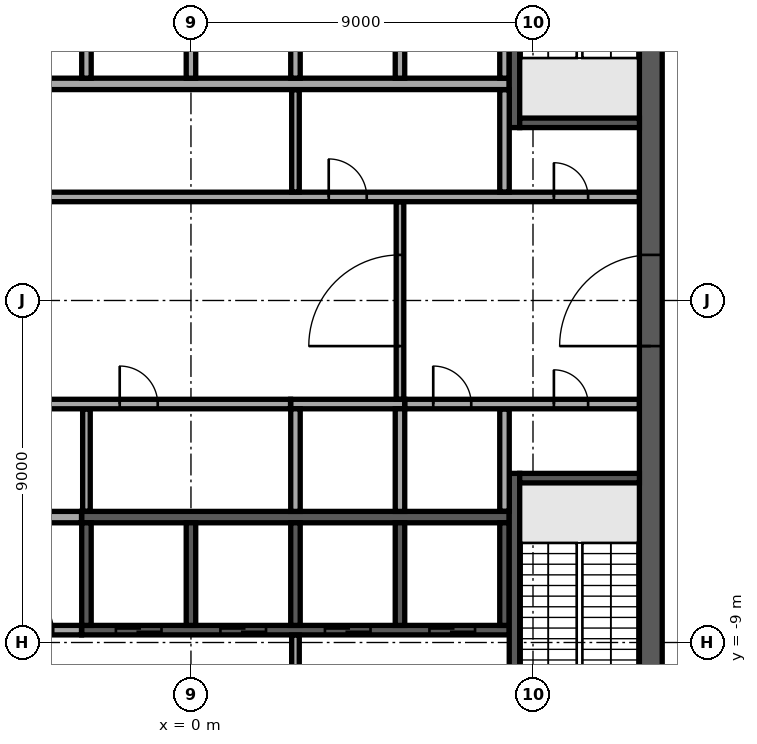
"""IFC4 building model, lengths in metres.
Left out: names, types, materials, properties, quantities, classifications, styles, units other than length and angle.
Written with IfcOpenShell. Run it as: python <this file> out.ifc"""

import sys

from ifc_helpers import new_model, si_unit, direction, frame, frame_2d, origin, place, context, subcontext, project, spatial, rectangle, extrude, element, fill, save


model = new_model("IFC4")
c1 = context("Model", 3, precision=1e-05, world=origin(), true_north=direction((0.0, 1.0)))
c2 = subcontext(c1, "Body", "Model", "MODEL_VIEW")
j1 = project(units=[si_unit("LENGTHUNIT", "METRE"), si_unit("PLANEANGLEUNIT", "RADIAN")], contexts=[c1])
p1 = place(None, origin())
s1 = spatial("IfcSite", under=j1, at=p1, CompositionType="ELEMENT")
p2 = place(p1, origin())
s2 = spatial("IfcBuilding", under=s1, at=p2, CompositionType="ELEMENT")
p3 = place(p2, frame((0.0, 0.0, 344.5)))
s3 = spatial("IfcBuildingStorey", under=s2, at=p3, CompositionType="ELEMENT", Elevation=344.5)
p4 = place(p3, frame((12.1, -11.8, 0.0), z_axis=(0.0, 0.0, 1.0), x_axis=(0.0, 1.0, 0.0)))
e1 = element("IfcWall", 1, at=p4, inside=s3, PredefinedType="SHEAR", context=c2, shape_type="SweptSolid", body=[
    extrude(rectangle(XDim=23.6, YDim=0.6, at=frame_2d((11.8, 0.0))), origin(), (0.0, 0.0, 1.0), 5.3),
])
p5 = place(p4, frame((10.6, 0.0, 0.0)))
e2 = element("IfcOpeningElement", 2, at=p5, cuts=e1, PredefinedType="OPENING", context=c2, shape_type="SweptSolid", body=[
    extrude(rectangle(XDim=2.4, YDim=2.4, at=frame_2d((1.2, 1.2))), frame((0.0, 0.31, 0.0), z_axis=(0.0, -1.0, 0.0), x_axis=(1.0, 0.0, 0.0)), (0.0, 0.0, 1.0), 0.62),
])
p6 = place(p3, frame((-8.375, 5.7, 0.0), z_axis=(0.0, 0.0, 1.0), x_axis=(1.0, 0.0, 0.0)))
e3 = element("IfcWall", 3, at=p6, inside=s3, PredefinedType="SOLIDWALL", context=c2, shape_type="SweptSolid", body=[
    extrude(rectangle(XDim=16.75, YDim=0.3, at=frame_2d((8.375, 0.0))), origin(), (0.0, 0.0, 1.0), 5.3),
])
p7 = place(p3, frame((-2.875, -5.7, 0.0), z_axis=(0.0, 0.0, 1.0), x_axis=(1.0, 0.0, 0.0)))
e4 = element("IfcWall", 4, at=p7, inside=s3, PredefinedType="SOLIDWALL", context=c2, shape_type="SweptSolid", body=[
    extrude(rectangle(XDim=11.25, YDim=0.3, at=frame_2d((5.625, 0.0))), origin(), (0.0, 0.0, 1.0), 5.3),
])
for number, where, z_axis, x_axis in (
    (5, (-2.75, 5.85, 0.0), (0.0, 0.0, 1.0), (0.0, 1.0, 0.0)),
    (6, (0.0, 5.85, 0.0), (0.0, 0.0, 1.0), (0.0, 1.0, 0.0)),
    (7, (2.75, 5.85, 0.0), (0.0, 0.0, 1.0), (0.0, 1.0, 0.0)),
    (8, (5.5, 5.85, 0.0), (0.0, 0.0, 1.0), (0.0, 1.0, 0.0)),
    (9, (8.25, 5.85, 0.0), (0.0, 0.0, 1.0), (0.0, 1.0, 0.0)),
):
    element("IfcWall", number, at=place(p3, frame(where, z_axis=z_axis, x_axis=x_axis)), inside=s3, PredefinedType="SOLIDWALL", context=c2, shape_type="SweptSolid", body=[
        extrude(rectangle(XDim=2.7, YDim=0.25, at=frame_2d((1.35, 0.0))), origin(), (0.0, 0.0, 1.0), 5.3),
    ])
p8 = place(p3, frame((2.625, -2.725, 0.0), z_axis=(0.0, 0.0, 1.0), x_axis=(1.0, 0.0, 0.0)))
e10 = element("IfcWall", 10, at=p8, inside=s3, PredefinedType="SOLIDWALL", context=c2, shape_type="SweptSolid", body=[
    extrude(rectangle(XDim=3.0, YDim=0.25, at=frame_2d((1.5, 0.0))), origin(), (0.0, 0.0, 1.0), 5.3),
])
for number, where, z_axis, x_axis in (
    (11, (2.75, -5.55, 0.0), (0.0, 0.0, 1.0), (0.0, 1.0, 0.0)),
    (12, (5.5, -5.55, 0.0), (0.0, 0.0, 1.0), (0.0, 1.0, 0.0)),
):
    element("IfcWall", number, at=place(p3, frame(where, z_axis=z_axis, x_axis=x_axis)), inside=s3, PredefinedType="SOLIDWALL", context=c2, shape_type="SweptSolid", body=[
        extrude(rectangle(XDim=2.7, YDim=0.25, at=frame_2d((1.35, 0.0))), origin(), (0.0, 0.0, 1.0), 5.3),
    ])
p9 = place(p3, frame((-2.875, -8.675, 0.0), z_axis=(0.0, 0.0, 1.0), x_axis=(1.0, 0.0, 0.0)))
e13 = element("IfcWall", 13, at=p9, inside=s3, PredefinedType="SOLIDWALL", context=c2, shape_type="SweptSolid", body=[
    extrude(rectangle(XDim=11.25, YDim=0.25, at=frame_2d((5.625, 0.0))), origin(), (0.0, 0.0, 1.0), 5.3),
])
p10 = place(p9, frame((0.9, 0.0, 0.0)))
e14 = element("IfcOpeningElement", 14, at=p10, cuts=e13, PredefinedType="OPENING", context=c2, shape_type="SweptSolid", body=[
    extrude(rectangle(XDim=1.2, YDim=2.1, at=frame_2d((0.6, 1.05))), frame((0.0, 0.135, 0.0), z_axis=(0.0, -1.0, 0.0), x_axis=(1.0, 0.0, 0.0)), (0.0, 0.0, 1.0), 0.27),
])
p11 = place(p9, frame((3.65, 0.0, 0.0)))
e15 = element("IfcOpeningElement", 15, at=p11, cuts=e13, PredefinedType="OPENING", context=c2, shape_type="SweptSolid", body=[
    extrude(rectangle(XDim=1.2, YDim=2.1, at=frame_2d((0.6, 1.05))), frame((0.0, 0.135, 0.0), z_axis=(0.0, -1.0, 0.0), x_axis=(1.0, 0.0, 0.0)), (0.0, 0.0, 1.0), 0.27),
])
p12 = place(p9, frame((6.4, 0.0, 0.0)))
e16 = element("IfcOpeningElement", 16, at=p12, cuts=e13, PredefinedType="OPENING", context=c2, shape_type="SweptSolid", body=[
    extrude(rectangle(XDim=1.2, YDim=2.1, at=frame_2d((0.6, 1.05))), frame((0.0, 0.135, 0.0), z_axis=(0.0, -1.0, 0.0), x_axis=(1.0, 0.0, 0.0)), (0.0, 0.0, 1.0), 0.27),
])
p13 = place(p9, frame((9.15, 0.0, 0.0)))
e17 = element("IfcOpeningElement", 17, at=p13, cuts=e13, PredefinedType="OPENING", context=c2, shape_type="SweptSolid", body=[
    extrude(rectangle(XDim=1.2, YDim=2.1, at=frame_2d((0.6, 1.05))), frame((0.0, 0.135, 0.0), z_axis=(0.0, -1.0, 0.0), x_axis=(1.0, 0.0, 0.0)), (0.0, 0.0, 1.0), 0.27),
])
for number, where, z_axis, x_axis in (
    (18, (-2.75, -8.55, 0.0), (0.0, 0.0, 1.0), (0.0, 1.0, 0.0)),
    (19, (0.0, -8.55, 0.0), (0.0, 0.0, 1.0), (0.0, 1.0, 0.0)),
    (20, (2.75, -8.55, 0.0), (0.0, 0.0, 1.0), (0.0, 1.0, 0.0)),
    (21, (5.5, -8.55, 0.0), (0.0, 0.0, 1.0), (0.0, 1.0, 0.0)),
    (22, (8.25, -8.55, 0.0), (0.0, 0.0, 1.0), (0.0, 1.0, 0.0)),
):
    element("IfcWall", number, at=place(p3, frame(where, z_axis=z_axis, x_axis=x_axis)), inside=s3, PredefinedType="SOLIDWALL", context=c2, shape_type="SweptSolid", body=[
        extrude(rectangle(XDim=2.7, YDim=0.25, at=frame_2d((1.35, 0.0))), origin(), (0.0, 0.0, 1.0), 5.3),
    ])
p14 = place(p3, frame((8.512, 4.55, 0.0), z_axis=(0.0, 0.0, 1.0), x_axis=(0.0, 1.0, 0.0)))
e23 = element("IfcWall", 23, at=p14, inside=s3, PredefinedType="SOLIDWALL", context=c2, shape_type="SweptSolid", body=[
    extrude(rectangle(XDim=7.25, YDim=0.275, at=frame_2d((3.625, 0.0))), origin(), (0.0, 0.0, 1.0), 5.3),
])
p15 = place(p14, frame((6.0, 0.0, 0.0)))
e24 = element("IfcOpeningElement", 24, at=p15, cuts=e23, PredefinedType="OPENING", context=c2, shape_type="SweptSolid", body=[
    extrude(rectangle(XDim=1.0, YDim=2.1, at=frame_2d((0.5, 1.05))), frame((0.0, 0.147, 0.0), z_axis=(0.0, -1.0, 0.0), x_axis=(1.0, 0.0, 0.0)), (0.0, 0.0, 1.0), 0.295),
])
p16 = place(p3, frame((8.65, 4.675, 0.0), z_axis=(0.0, 0.0, 1.0), x_axis=(1.0, 0.0, 0.0)))
e25 = element("IfcWall", 25, at=p16, inside=s3, PredefinedType="SOLIDWALL", context=c2, shape_type="SweptSolid", body=[
    extrude(rectangle(XDim=3.15, YDim=0.25, at=frame_2d((1.575, 0.0))), origin(), (0.0, 0.0, 1.0), 5.3),
])
p17 = place(p3, frame((8.512, -4.55, 0.0), z_axis=(0.0, 0.0, 1.0), x_axis=(0.0, -1.0, 0.0)))
e26 = element("IfcWall", 26, at=p17, inside=s3, PredefinedType="SOLIDWALL", context=c2, shape_type="SweptSolid", body=[
    extrude(rectangle(XDim=7.25, YDim=0.275, at=frame_2d((3.625, 0.0))), origin(), (0.0, 0.0, 1.0), 5.3),
])
p18 = place(p17, frame((6.0, 0.0, 0.0)))
e27 = element("IfcOpeningElement", 27, at=p18, cuts=e26, PredefinedType="OPENING", context=c2, shape_type="SweptSolid", body=[
    extrude(rectangle(XDim=1.0, YDim=2.1, at=frame_2d((0.5, 1.05))), frame((0.0, 0.147, 0.0), z_axis=(0.0, -1.0, 0.0), x_axis=(1.0, 0.0, 0.0)), (0.0, 0.0, 1.0), 0.295),
])
p19 = place(p3, frame((8.65, -4.675, 0.0), z_axis=(0.0, 0.0, 1.0), x_axis=(1.0, 0.0, 0.0)))
e28 = element("IfcWall", 28, at=p19, inside=s3, PredefinedType="SOLIDWALL", context=c2, shape_type="SweptSolid", body=[
    extrude(rectangle(XDim=3.15, YDim=0.25, at=frame_2d((1.575, 0.0))), origin(), (0.0, 0.0, 1.0), 5.3),
])
p20 = place(p3, frame((2.75, -11.795, 0.0), z_axis=(0.0, 0.0, 1.0), x_axis=(0.0, 1.0, 0.0)))
e29 = element("IfcWall", 29, at=p20, inside=s3, PredefinedType="PARTITIONING", context=c2, shape_type="SweptSolid", body=[
    extrude(rectangle(XDim=2.99, YDim=0.2, at=frame_2d((1.495, 0.0))), origin(), (0.0, 0.0, 1.0), 5.3),
])
p21 = place(p3, frame((-8.37, -8.675, 0.0), z_axis=(0.0, 0.0, 1.0), x_axis=(1.0, 0.0, 0.0)))
e30 = element("IfcWall", 30, at=p21, inside=s3, PredefinedType="PARTITIONING", context=c2, shape_type="SweptSolid", body=[
    extrude(rectangle(XDim=5.49, YDim=0.25, at=frame_2d((2.745, 0.0))), origin(), (0.0, 0.0, 1.0), 5.3),
])
p22 = place(p21, frame((0.995, 0.0, 0.0)))
e31 = element("IfcOpeningElement", 31, at=p22, cuts=e30, PredefinedType="OPENING", context=c2, shape_type="SweptSolid", body=[
    extrude(rectangle(XDim=1.0, YDim=2.1, at=frame_2d((0.5, 1.05))), frame((0.0, 0.135, 0.0), z_axis=(0.0, -1.0, 0.0), x_axis=(1.0, 0.0, 0.0)), (0.0, 0.0, 1.0), 0.27),
])
p23 = place(p21, frame((3.745, 0.0, 0.0)))
e32 = element("IfcOpeningElement", 32, at=p23, cuts=e30, PredefinedType="OPENING", context=c2, shape_type="SweptSolid", body=[
    extrude(rectangle(XDim=1.0, YDim=2.1, at=frame_2d((0.5, 1.05))), frame((0.0, 0.135, 0.0), z_axis=(0.0, -1.0, 0.0), x_axis=(1.0, 0.0, 0.0)), (0.0, 0.0, 1.0), 0.27),
])
p24 = place(p3, frame((-8.35, -5.7, 0.0), z_axis=(0.0, 0.0, 1.0), x_axis=(1.0, 0.0, 0.0)))
e33 = element("IfcWall", 33, at=p24, inside=s3, PredefinedType="PARTITIONING", context=c2, shape_type="SweptSolid", body=[
    extrude(rectangle(XDim=5.47, YDim=0.3, at=frame_2d((2.735, 0.0))), origin(), (0.0, 0.0, 1.0), 5.3),
])
p25 = place(p3, frame((-2.75, -5.545, 0.0), z_axis=(0.0, 0.0, 1.0), x_axis=(0.0, 1.0, 0.0)))
e34 = element("IfcWall", 34, at=p25, inside=s3, PredefinedType="PARTITIONING", context=c2, shape_type="SweptSolid", body=[
    extrude(rectangle(XDim=2.69, YDim=0.2, at=frame_2d((1.345, 0.0))), origin(), (0.0, 0.0, 1.0), 5.3),
])
p26 = place(p3, frame((8.25, -5.545, 0.0), z_axis=(0.0, 0.0, 1.0), x_axis=(0.0, 1.0, 0.0)))
e35 = element("IfcWall", 35, at=p26, inside=s3, PredefinedType="PARTITIONING", context=c2, shape_type="SweptSolid", body=[
    extrude(rectangle(XDim=2.69, YDim=0.25, at=frame_2d((1.345, 0.0))), origin(), (0.0, 0.0, 1.0), 5.3),
])
p27 = place(p3, frame((-11.795, -2.725, 0.0), z_axis=(0.0, 0.0, 1.0), x_axis=(1.0, 0.0, 0.0)))
e36 = element("IfcWall", 36, at=p27, inside=s3, PredefinedType="PARTITIONING", context=c2, shape_type="SweptSolid", body=[
    extrude(rectangle(XDim=14.415, YDim=0.25, at=frame_2d((7.208, 0.0))), origin(), (0.0, 0.0, 1.0), 5.3),
])
p28 = place(p27, frame((1.295, 0.0, 0.0)))
e37 = element("IfcOpeningElement", 37, at=p28, cuts=e36, PredefinedType="OPENING", context=c2, shape_type="SweptSolid", body=[
    extrude(rectangle(XDim=1.0, YDim=2.1, at=frame_2d((0.5, 1.05))), frame((0.0, 0.135, 0.0), z_axis=(0.0, -1.0, 0.0), x_axis=(1.0, 0.0, 0.0)), (0.0, 0.0, 1.0), 0.27),
])
p29 = place(p27, frame((4.42, 0.0, 0.0)))
e38 = element("IfcOpeningElement", 38, at=p29, cuts=e36, PredefinedType="OPENING", context=c2, shape_type="SweptSolid", body=[
    extrude(rectangle(XDim=1.0, YDim=2.1, at=frame_2d((0.5, 1.05))), frame((0.0, 0.135, 0.0), z_axis=(0.0, -1.0, 0.0), x_axis=(1.0, 0.0, 0.0)), (0.0, 0.0, 1.0), 0.27),
])
p30 = place(p27, frame((9.92, 0.0, 0.0)))
e39 = element("IfcOpeningElement", 39, at=p30, cuts=e36, PredefinedType="OPENING", context=c2, shape_type="SweptSolid", body=[
    extrude(rectangle(XDim=1.0, YDim=2.1, at=frame_2d((0.5, 1.05))), frame((0.0, 0.135, 0.0), z_axis=(0.0, -1.0, 0.0), x_axis=(1.0, 0.0, 0.0)), (0.0, 0.0, 1.0), 0.27),
])
p31 = place(p3, frame((5.63, -2.725, 0.0), z_axis=(0.0, 0.0, 1.0), x_axis=(1.0, 0.0, 0.0)))
e40 = element("IfcWall", 40, at=p31, inside=s3, PredefinedType="PARTITIONING", context=c2, shape_type="SweptSolid", body=[
    extrude(rectangle(XDim=6.165, YDim=0.25, at=frame_2d((3.083, 0.0))), origin(), (0.0, 0.0, 1.0), 5.3),
])
p32 = place(p31, frame((0.745, 0.0, 0.0)))
e41 = element("IfcOpeningElement", 41, at=p32, cuts=e40, PredefinedType="OPENING", context=c2, shape_type="SweptSolid", body=[
    extrude(rectangle(XDim=1.0, YDim=2.1, at=frame_2d((0.5, 1.05))), frame((0.0, 0.135, 0.0), z_axis=(0.0, -1.0, 0.0), x_axis=(1.0, 0.0, 0.0)), (0.0, 0.0, 1.0), 0.27),
])
p33 = place(p31, frame((3.92, 0.0, 0.0)))
e42 = element("IfcOpeningElement", 42, at=p33, cuts=e40, PredefinedType="OPENING", context=c2, shape_type="SweptSolid", body=[
    extrude(rectangle(XDim=0.9, YDim=2.1, at=frame_2d((0.45, 1.05))), frame((0.0, 0.135, 0.0), z_axis=(0.0, -1.0, 0.0), x_axis=(1.0, 0.0, 0.0)), (0.0, 0.0, 1.0), 0.27),
])
p34 = place(p3, frame((5.5, -2.595, 0.0), z_axis=(0.0, 0.0, 1.0), x_axis=(0.0, 1.0, 0.0)))
e43 = element("IfcWall", 43, at=p34, inside=s3, PredefinedType="PARTITIONING", context=c2, shape_type="SweptSolid", body=[
    extrude(rectangle(XDim=5.19, YDim=0.2, at=frame_2d((2.595, 0.0))), origin(), (0.0, 0.0, 1.0), 5.3),
])
p35 = place(p34, frame((1.395, 0.0, 0.0)))
e44 = element("IfcOpeningElement", 44, at=p35, cuts=e43, PredefinedType="OPENING", context=c2, shape_type="SweptSolid", body=[
    extrude(rectangle(XDim=2.4, YDim=2.4, at=frame_2d((1.2, 1.2))), frame((0.0, 0.11, 0.0), z_axis=(0.0, -1.0, 0.0), x_axis=(1.0, 0.0, 0.0)), (0.0, 0.0, 1.0), 0.22),
])
p36 = place(p3, frame((-11.795, 2.725, 0.0), z_axis=(0.0, 0.0, 1.0), x_axis=(1.0, 0.0, 0.0)))
e45 = element("IfcWall", 45, at=p36, inside=s3, PredefinedType="PARTITIONING", context=c2, shape_type="SweptSolid", body=[
    extrude(rectangle(XDim=23.59, YDim=0.25, at=frame_2d((11.795, 0.0))), origin(), (0.0, 0.0, 1.0), 5.3),
])
p37 = place(p36, frame((21.345, 0.0, 0.0)))
e46 = element("IfcOpeningElement", 46, at=p37, cuts=e45, PredefinedType="OPENING", context=c2, shape_type="SweptSolid", body=[
    extrude(rectangle(XDim=0.9, YDim=2.1, at=frame_2d((0.45, 1.05))), frame((0.0, 0.135, 0.0), z_axis=(0.0, -1.0, 0.0), x_axis=(1.0, 0.0, 0.0)), (0.0, 0.0, 1.0), 0.27),
])
p38 = place(p36, frame((1.345, 0.0, 0.0)))
e47 = element("IfcOpeningElement", 47, at=p38, cuts=e45, PredefinedType="OPENING", context=c2, shape_type="SweptSolid", body=[
    extrude(rectangle(XDim=0.9, YDim=2.1, at=frame_2d((0.45, 1.05))), frame((0.0, 0.135, 0.0), z_axis=(0.0, -1.0, 0.0), x_axis=(1.0, 0.0, 0.0)), (0.0, 0.0, 1.0), 0.27),
])
p39 = place(p36, frame((4.32, 0.0, 0.0)))
e48 = element("IfcOpeningElement", 48, at=p39, cuts=e45, PredefinedType="OPENING", context=c2, shape_type="SweptSolid", body=[
    extrude(rectangle(XDim=1.2, YDim=2.1, at=frame_2d((0.6, 1.05))), frame((0.0, 0.135, 0.0), z_axis=(0.0, -1.0, 0.0), x_axis=(1.0, 0.0, 0.0)), (0.0, 0.0, 1.0), 0.27),
])
p40 = place(p36, frame((15.42, 0.0, 0.0)))
e49 = element("IfcOpeningElement", 49, at=p40, cuts=e45, PredefinedType="OPENING", context=c2, shape_type="SweptSolid", body=[
    extrude(rectangle(XDim=1.0, YDim=2.1, at=frame_2d((0.5, 1.05))), frame((0.0, 0.135, 0.0), z_axis=(0.0, -1.0, 0.0), x_axis=(1.0, 0.0, 0.0)), (0.0, 0.0, 1.0), 0.27),
])
p41 = place(p3, frame((2.75, 2.855, 0.0), z_axis=(0.0, 0.0, 1.0), x_axis=(0.0, 1.0, 0.0)))
e50 = element("IfcWall", 50, at=p41, inside=s3, PredefinedType="PARTITIONING", context=c2, shape_type="SweptSolid", body=[
    extrude(rectangle(XDim=2.69, YDim=0.2, at=frame_2d((1.345, 0.0))), origin(), (0.0, 0.0, 1.0), 5.3),
])
p42 = place(p3, frame((8.25, 2.855, 0.0), z_axis=(0.0, 0.0, 1.0), x_axis=(0.0, 1.0, 0.0)))
e51 = element("IfcWall", 51, at=p42, inside=s3, PredefinedType="PARTITIONING", context=c2, shape_type="SweptSolid", body=[
    extrude(rectangle(XDim=2.69, YDim=0.25, at=frame_2d((1.345, 0.0))), origin(), (0.0, 0.0, 1.0), 5.3),
])
p43 = place(p5, origin())
e52 = element("IfcDoor", 52, at=p43, inside=s3, OperationType="SINGLE_SWING_LEFT", PredefinedType="DOOR", context=c2, shape_type="SweptSolid", body=[
    extrude(rectangle(XDim=2.4, YDim=2.4, at=frame_2d((1.2, 1.2))), frame((0.0, 0.025, 0.0), z_axis=(0.0, -1.0, 0.0), x_axis=(1.0, 0.0, 0.0)), (0.0, 0.0, 1.0), 0.05),
])
fill(e2, e52)
p44 = place(p10, origin())
e53 = element("IfcDoor", 53, at=p44, inside=s3, OperationType="DOUBLE_DOOR_SLIDING", PredefinedType="DOOR", context=c2, shape_type="SweptSolid", body=[
    extrude(rectangle(XDim=1.2, YDim=2.1, at=frame_2d((0.6, 1.05))), frame((0.0, 0.025, 0.0), z_axis=(0.0, -1.0, 0.0), x_axis=(1.0, 0.0, 0.0)), (0.0, 0.0, 1.0), 0.05),
])
fill(e14, e53)
p45 = place(p11, origin())
e54 = element("IfcDoor", 54, at=p45, inside=s3, OperationType="DOUBLE_DOOR_SLIDING", PredefinedType="DOOR", context=c2, shape_type="SweptSolid", body=[
    extrude(rectangle(XDim=1.2, YDim=2.1, at=frame_2d((0.6, 1.05))), frame((0.0, 0.025, 0.0), z_axis=(0.0, -1.0, 0.0), x_axis=(1.0, 0.0, 0.0)), (0.0, 0.0, 1.0), 0.05),
])
fill(e15, e54)
p46 = place(p12, origin())
e55 = element("IfcDoor", 55, at=p46, inside=s3, OperationType="DOUBLE_DOOR_SLIDING", PredefinedType="DOOR", context=c2, shape_type="SweptSolid", body=[
    extrude(rectangle(XDim=1.2, YDim=2.1, at=frame_2d((0.6, 1.05))), frame((0.0, 0.025, 0.0), z_axis=(0.0, -1.0, 0.0), x_axis=(1.0, 0.0, 0.0)), (0.0, 0.0, 1.0), 0.05),
])
fill(e16, e55)
p47 = place(p13, origin())
e56 = element("IfcDoor", 56, at=p47, inside=s3, OperationType="DOUBLE_DOOR_SLIDING", PredefinedType="DOOR", context=c2, shape_type="SweptSolid", body=[
    extrude(rectangle(XDim=1.2, YDim=2.1, at=frame_2d((0.6, 1.05))), frame((0.0, 0.025, 0.0), z_axis=(0.0, -1.0, 0.0), x_axis=(1.0, 0.0, 0.0)), (0.0, 0.0, 1.0), 0.05),
])
fill(e17, e56)
p48 = place(p23, origin())
e57 = element("IfcDoor", 57, at=p48, inside=s3, OperationType="SINGLE_SWING_LEFT", PredefinedType="DOOR", context=c2, shape_type="SweptSolid", body=[
    extrude(rectangle(XDim=1.0, YDim=2.1, at=frame_2d((0.5, 1.05))), frame((0.0, 0.025, 0.0), z_axis=(0.0, -1.0, 0.0), x_axis=(1.0, 0.0, 0.0)), (0.0, 0.0, 1.0), 0.05),
])
fill(e32, e57)
p49 = place(p32, origin())
e58 = element("IfcDoor", 58, at=p49, inside=s3, OperationType="SINGLE_SWING_LEFT", PredefinedType="DOOR", context=c2, shape_type="SweptSolid", body=[
    extrude(rectangle(XDim=1.0, YDim=2.1, at=frame_2d((0.5, 1.05))), frame((0.0, 0.025, 0.0), z_axis=(0.0, -1.0, 0.0), x_axis=(1.0, 0.0, 0.0)), (0.0, 0.0, 1.0), 0.05),
])
fill(e41, e58)
p50 = place(p37, origin())
e59 = element("IfcDoor", 59, at=p50, inside=s3, OperationType="SINGLE_SWING_LEFT", PredefinedType="DOOR", context=c2, shape_type="SweptSolid", body=[
    extrude(rectangle(XDim=0.9, YDim=2.1, at=frame_2d((0.45, 1.05))), frame((0.0, 0.025, 0.0), z_axis=(0.0, -1.0, 0.0), x_axis=(1.0, 0.0, 0.0)), (0.0, 0.0, 1.0), 0.05),
])
fill(e46, e59)
p51 = place(p33, origin())
e60 = element("IfcDoor", 60, at=p51, inside=s3, OperationType="SINGLE_SWING_LEFT", PredefinedType="DOOR", context=c2, shape_type="SweptSolid", body=[
    extrude(rectangle(XDim=0.9, YDim=2.1, at=frame_2d((0.45, 1.05))), frame((0.0, 0.025, 0.0), z_axis=(0.0, -1.0, 0.0), x_axis=(1.0, 0.0, 0.0)), (0.0, 0.0, 1.0), 0.05),
])
fill(e42, e60)
p52 = place(p40, origin())
e61 = element("IfcDoor", 61, at=p52, inside=s3, OperationType="SINGLE_SWING_LEFT", PredefinedType="DOOR", context=c2, shape_type="SweptSolid", body=[
    extrude(rectangle(XDim=1.0, YDim=2.1, at=frame_2d((0.5, 1.05))), frame((0.0, 0.025, 0.0), z_axis=(0.0, -1.0, 0.0), x_axis=(1.0, 0.0, 0.0)), (0.0, 0.0, 1.0), 0.05),
])
fill(e49, e61)
p53 = place(p30, origin())
e62 = element("IfcDoor", 62, at=p53, inside=s3, OperationType="SINGLE_SWING_LEFT", PredefinedType="DOOR", context=c2, shape_type="SweptSolid", body=[
    extrude(rectangle(XDim=1.0, YDim=2.1, at=frame_2d((0.5, 1.05))), frame((0.0, 0.025, 0.0), z_axis=(0.0, -1.0, 0.0), x_axis=(1.0, 0.0, 0.0)), (0.0, 0.0, 1.0), 0.05),
])
fill(e39, e62)
p54 = place(p35, origin())
e63 = element("IfcDoor", 63, at=p54, inside=s3, OperationType="SINGLE_SWING_LEFT", PredefinedType="DOOR", context=c2, shape_type="SweptSolid", body=[
    extrude(rectangle(XDim=2.4, YDim=2.4, at=frame_2d((1.2, 1.2))), frame((0.0, 0.025, 0.0), z_axis=(0.0, -1.0, 0.0), x_axis=(1.0, 0.0, 0.0)), (0.0, 0.0, 1.0), 0.05),
])
fill(e44, e63)
save(model, sys.argv[1])
